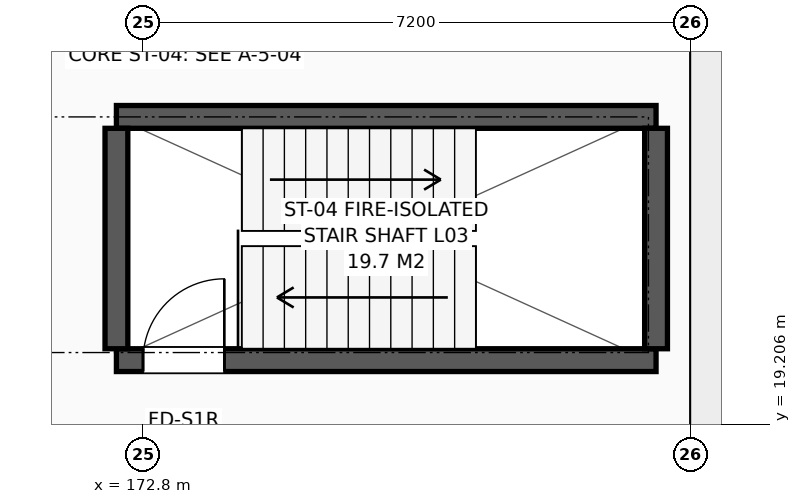
"""IFC4 building model, lengths in metres.
Left out: names, types, materials, properties, quantities, classifications, styles, units other than length and angle.
Written with IfcOpenShell. Run it as: python <this file> out.ifc"""

import sys

from ifc_helpers import new_model, si_unit, direction, frame, frame_2d, origin, place, context, subcontext, project, spatial, rectangle, extrude, element, fill, save


model = new_model("IFC4")
c1 = context("Model", 3, precision=1e-05, world=origin(), true_north=direction((0.0, 1.0)))
c2 = subcontext(c1, "Body", "Model", "MODEL_VIEW")
j1 = project(units=[si_unit("LENGTHUNIT", "METRE"), si_unit("PLANEANGLEUNIT", "RADIAN")], contexts=[c1])
p1 = place(None, origin())
s1 = spatial("IfcSite", under=j1, at=p1, CompositionType="ELEMENT")
p2 = place(p1, origin())
s2 = spatial("IfcBuilding", under=s1, at=p2, CompositionType="ELEMENT")
p3 = place(p2, frame((0.0, 0.0, 13.2)))
s3 = spatial("IfcBuildingStorey", under=s2, at=p3, CompositionType="ELEMENT", Elevation=13.2)
p4 = place(p3, frame((172.45, 20.05, 0.0), z_axis=(0.0, 0.0, 1.0), x_axis=(1.0, 0.0, 0.0)))
e1 = element("IfcWall", 1, at=p4, inside=s3, PredefinedType="SHEAR", context=c2, shape_type="SweptSolid", body=[
    extrude(rectangle(XDim=7.1, YDim=0.3, at=frame_2d((3.55, 0.0))), origin(), (0.0, 0.0, 1.0), 3.45),
])
p5 = place(p4, frame((0.35, 0.0, 0.0)))
e2 = element("IfcOpeningElement", 2, at=p5, cuts=e1, PredefinedType="OPENING", context=c2, shape_type="SweptSolid", body=[
    extrude(rectangle(XDim=1.07, YDim=2.15, at=frame_2d((0.535, 1.075))), frame((0.0, 0.16, 0.0), z_axis=(0.0, -1.0, 0.0), x_axis=(1.0, 0.0, 0.0)), (0.0, 0.0, 1.0), 0.32),
])
p6 = place(p3, frame((179.55, 23.25, 0.0), z_axis=(0.0, 0.0, 1.0), x_axis=(-1.0, 0.0, 0.0)))
e3 = element("IfcWall", 3, at=p6, inside=s3, PredefinedType="SHEAR", context=c2, shape_type="SweptSolid", body=[
    extrude(rectangle(XDim=7.1, YDim=0.3, at=frame_2d((3.55, 0.0))), origin(), (0.0, 0.0, 1.0), 3.45),
])
for number, where, z_axis, x_axis in (
    (4, (179.55, 20.2, 0.0), (0.0, 0.0, 1.0), (0.0, 1.0, 0.0)),
    (5, (172.45, 23.1, 0.0), (0.0, 0.0, 1.0), (0.0, -1.0, 0.0)),
):
    element("IfcWall", number, at=place(p3, frame(where, z_axis=z_axis, x_axis=x_axis)), inside=s3, PredefinedType="SHEAR", context=c2, shape_type="SweptSolid", body=[
        extrude(rectangle(XDim=2.9, YDim=0.3, at=frame_2d((1.45, 0.0))), origin(), (0.0, 0.0, 1.0), 3.45),
    ])
p7 = place(p5, origin())
e6 = element("IfcDoor", 6, at=p7, inside=s3, OperationType="SINGLE_SWING_RIGHT", PredefinedType="DOOR", context=c2, shape_type="SweptSolid", body=[
    extrude(rectangle(XDim=1.07, YDim=2.15, at=frame_2d((0.535, 1.075))), frame((0.0, 0.025, 0.0), z_axis=(0.0, -1.0, 0.0), x_axis=(1.0, 0.0, 0.0)), (0.0, 0.0, 1.0), 0.05),
])
fill(e2, e6)
save(model, sys.argv[1])
